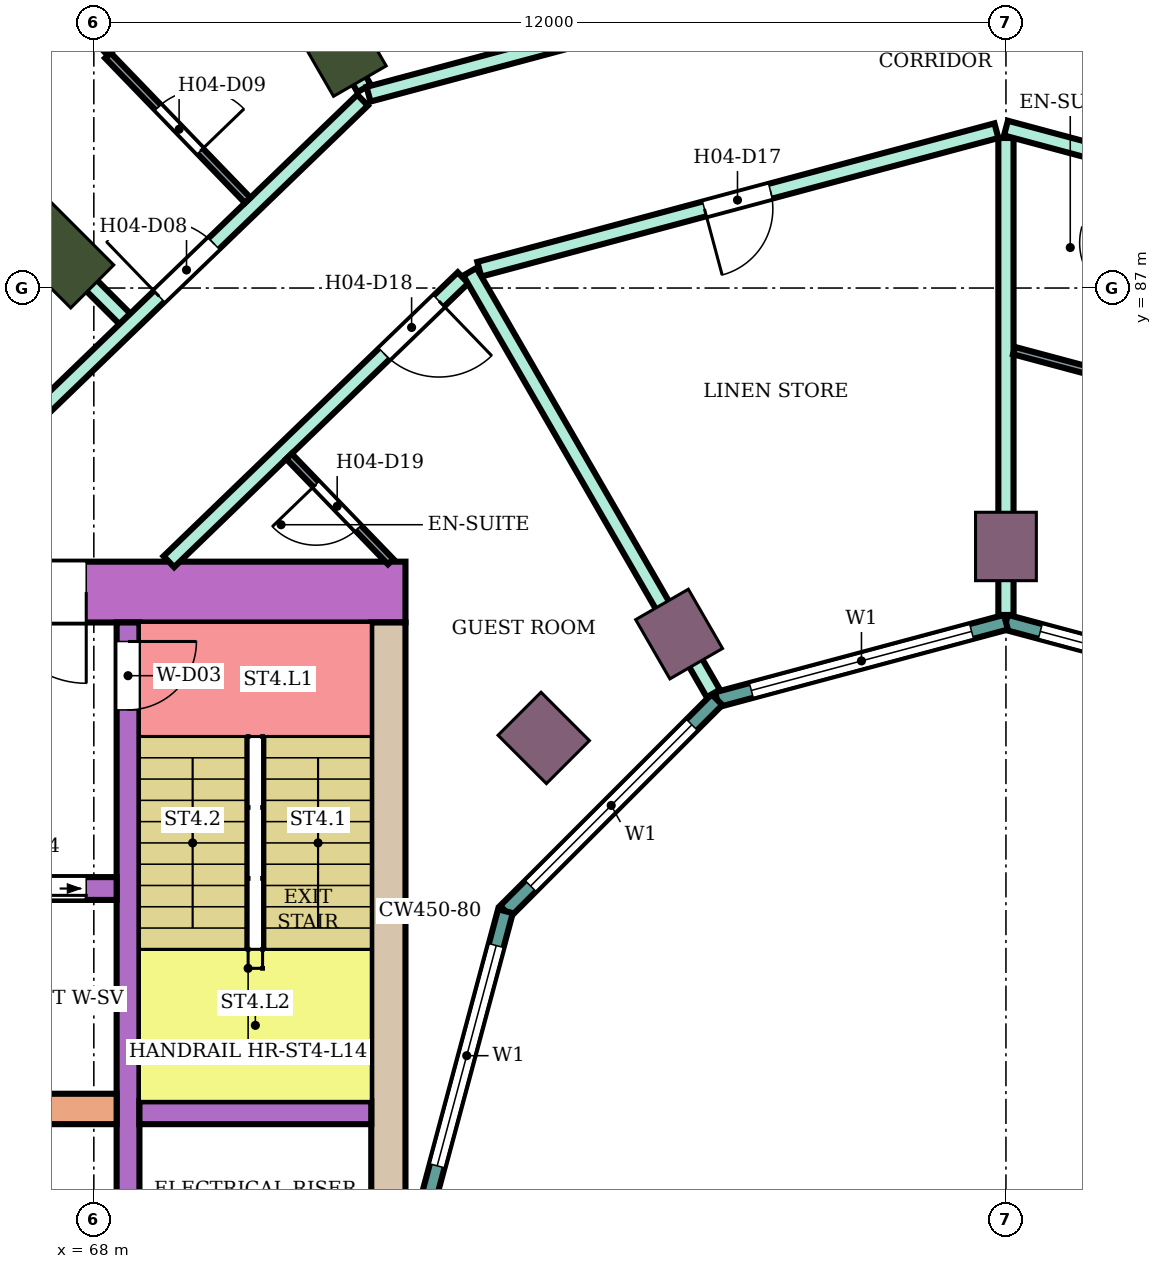
"""IFC4 building model, lengths in metres.
Left out: names, types, materials, properties, quantities, classifications, styles, units other than length and angle.
Written with IfcOpenShell. Run it as: python <this file> out.ifc"""

import sys

from ifc_helpers import new_model, si_unit, direction, frame, frame_2d, origin, origin_2d, place, context, subcontext, project, spatial, rectangle, extrude, element, fill, save


model = new_model("IFC4")
c1 = context("Model", 3, precision=1e-05, world=origin(), true_north=direction((0.0, 1.0)))
c2 = subcontext(c1, "Body", "Model", "MODEL_VIEW")
j1 = project(units=[si_unit("LENGTHUNIT", "METRE"), si_unit("PLANEANGLEUNIT", "RADIAN")], contexts=[c1])
p1 = place(None, origin())
s1 = spatial("IfcSite", under=j1, at=p1, CompositionType="ELEMENT")
p2 = place(p1, origin())
s2 = spatial("IfcBuilding", under=s1, at=p2, CompositionType="ELEMENT")
p3 = place(p2, frame((0.0, 0.0, 63.0)))
s3 = spatial("IfcBuildingStorey", under=s2, at=p3, CompositionType="ELEMENT", Elevation=63.0)
for number, where, z_axis, x_axis in (
    (1, (71.2, 90.242, 0.0), (0.0, 0.0, 1.0), (-0.5, 0.866, 0.0)),
    (2, (67.555, 87.445, 0.0), (0.0, 0.0, 1.0), (-0.707, 0.707, 0.0)),
):
    element("IfcColumn", number, at=place(p3, frame(where, z_axis=z_axis, x_axis=x_axis)), inside=s3, PredefinedType="COLUMN", context=c2, shape_type="SweptSolid", body=[
        extrude(rectangle(XDim=1.2, YDim=0.8, at=origin_2d()), origin(), (0.0, 0.0, 1.0), 3.8),
    ])
for number, where, z_axis, x_axis in (
    (3, (80.0, 83.6, 0.0), (0.0, 0.0, 1.0), (0.0, 1.0, 0.0)),
    (4, (75.7, 82.448, 0.0), (0.0, 0.0, 1.0), (-0.5, 0.866, 0.0)),
    (5, (73.919, 81.081, 0.0), (0.0, 0.0, 1.0), (-0.707, 0.707, 0.0)),
):
    element("IfcColumn", number, at=place(p3, frame(where, z_axis=z_axis, x_axis=x_axis)), inside=s3, PredefinedType="COLUMN", context=c2, shape_type="SweptSolid", body=[
        extrude(rectangle(XDim=0.9, YDim=0.8, at=origin_2d()), origin(), (0.0, 0.0, 1.0), 3.8),
    ])
p4 = place(p3, frame((72.1, 83.0, 0.0), z_axis=(0.0, 0.0, 1.0), x_axis=(-1.0, 0.0, 0.0)))
e6 = element("IfcWall", 6, at=p4, inside=s3, PredefinedType="SHEAR", context=c2, shape_type="SweptSolid", body=[
    extrude(rectangle(XDim=14.7, YDim=0.8, at=frame_2d((7.35, 0.0))), origin(), (0.0, 0.0, 1.0), 3.48),
])
p5 = place(p4, frame((4.2, 0.0, 0.0)))
e7 = element("IfcOpeningElement", 7, at=p5, cuts=e6, PredefinedType="OPENING", context=c2, shape_type="SweptSolid", body=[
    extrude(rectangle(XDim=2.4, YDim=2.4, at=frame_2d((1.2, 1.2))), frame((0.0, 0.41, 0.0), z_axis=(0.0, -1.0, 0.0), x_axis=(1.0, 0.0, 0.0)), (0.0, 0.0, 1.0), 0.82),
])
p6 = place(p3, frame((71.875, 82.6, 0.0), z_axis=(0.0, 0.0, 1.0), x_axis=(0.0, -1.0, 0.0)))
e8 = element("IfcWall", 8, at=p6, inside=s3, PredefinedType="SHEAR", context=c2, shape_type="SweptSolid", body=[
    extrude(rectangle(XDim=7.6, YDim=0.45, at=frame_2d((3.8, 0.0))), origin(), (0.0, 0.0, 1.0), 3.48),
])
p7 = place(p3, frame((68.45, 82.6, 0.0), z_axis=(0.0, 0.0, 1.0), x_axis=(0.0, -1.0, 0.0)))
e9 = element("IfcWall", 9, at=p7, inside=s3, PredefinedType="SHEAR", context=c2, shape_type="SweptSolid", body=[
    extrude(rectangle(XDim=7.6, YDim=0.3, at=frame_2d((3.8, 0.0))), origin(), (0.0, 0.0, 1.0), 3.48),
])
p8 = place(p7, frame((0.25, 0.0, 0.0)))
e10 = element("IfcOpeningElement", 10, at=p8, cuts=e9, PredefinedType="OPENING", context=c2, shape_type="SweptSolid", body=[
    extrude(rectangle(XDim=0.9, YDim=2.1, at=frame_2d((0.45, 1.05))), frame((0.0, 0.16, 0.0), z_axis=(0.0, -1.0, 0.0), x_axis=(1.0, 0.0, 0.0)), (0.0, 0.0, 1.0), 0.32),
])
p9 = place(p3, frame((71.65, 76.15, 0.0), z_axis=(0.0, 0.0, 1.0), x_axis=(-1.0, 0.0, 0.0)))
e11 = element("IfcWall", 11, at=p9, inside=s3, PredefinedType="SHEAR", context=c2, shape_type="SweptSolid", body=[
    extrude(rectangle(XDim=3.05, YDim=0.3, at=frame_2d((1.525, 0.0))), origin(), (0.0, 0.0, 1.0), 3.48),
])
p10 = place(p3, frame((68.3, 76.2, 0.0), z_axis=(0.0, 0.0, 1.0), x_axis=(-1.0, 0.0, 0.0)))
e12 = element("IfcWall", 12, at=p10, inside=s3, PredefinedType="SHEAR", context=c2, shape_type="SweptSolid", body=[
    extrude(rectangle(XDim=10.9, YDim=0.4, at=frame_2d((5.45, 0.0))), origin(), (0.0, 0.0, 1.0), 3.48),
])
p11 = place(p3, frame((68.3, 79.1, 0.0), z_axis=(0.0, 0.0, 1.0), x_axis=(-1.0, 0.0, 0.0)))
e13 = element("IfcWall", 13, at=p11, inside=s3, PredefinedType="SHEAR", context=c2, shape_type="SweptSolid", body=[
    extrude(rectangle(XDim=10.9, YDim=0.3, at=frame_2d((5.45, 0.0))), origin(), (0.0, 0.0, 1.0), 3.48),
])
p12 = place(p11, frame((0.4, 0.0, 0.0)))
e14 = element("IfcOpeningElement", 14, at=p12, cuts=e13, PredefinedType="OPENING", context=c2, shape_type="SweptSolid", body=[
    extrude(rectangle(XDim=1.4, YDim=2.1, at=frame_2d((0.7, 1.05))), frame((0.0, 0.16, 0.0), z_axis=(0.0, -1.0, 0.0), x_axis=(1.0, 0.0, 0.0)), (0.0, 0.0, 1.0), 0.32),
])
p13 = place(p11, frame((5.4, 0.0, 0.0)))
e15 = element("IfcOpeningElement", 15, at=p13, cuts=e13, PredefinedType="OPENING", context=c2, shape_type="SweptSolid", body=[
    extrude(rectangle(XDim=1.4, YDim=2.1, at=frame_2d((0.7, 1.05))), frame((0.0, 0.16, 0.0), z_axis=(0.0, -1.0, 0.0), x_axis=(1.0, 0.0, 0.0)), (0.0, 0.0, 1.0), 0.32),
])
p14 = place(p11, frame((8.1, 0.0, 0.0)))
e16 = element("IfcOpeningElement", 16, at=p14, cuts=e13, PredefinedType="OPENING", context=c2, shape_type="SweptSolid", body=[
    extrude(rectangle(XDim=1.0, YDim=2.1, at=frame_2d((0.5, 1.05))), frame((0.0, 0.16, 0.0), z_axis=(0.0, -1.0, 0.0), x_axis=(1.0, 0.0, 0.0)), (0.0, 0.0, 1.0), 0.32),
])
p15 = place(p3, frame((83.802, 81.585, 0.0), z_axis=(0.0, 0.0, 1.0), x_axis=(-0.965933654434, 0.258789828301, 0.0)))
e17 = element("IfcWall", 17, at=p15, inside=s3, PredefinedType="NOTDEFINED", context=c2, shape_type="SweptSolid", body=[
    extrude(rectangle(XDim=3.936, YDim=0.2, at=frame_2d((1.968, 0.0))), origin(), (0.0, 0.0, 1.0), 3.8),
])
p16 = place(p15, frame((0.468, 0.0, 0.9)))
e18 = element("IfcOpeningElement", 18, at=p16, cuts=e17, PredefinedType="OPENING", context=c2, shape_type="SweptSolid", body=[
    extrude(rectangle(XDim=3.0, YDim=2.3, at=frame_2d((1.5, 1.15))), frame((0.0, 0.11, 0.0), z_axis=(0.0, -1.0, 0.0), x_axis=(1.0, 0.0, 0.0)), (0.0, 0.0, 1.0), 0.22),
])
p17 = place(p3, frame((80.0, 82.604, 0.0), z_axis=(0.0, 0.0, 1.0), x_axis=(-0.965933654434, -0.258789828301, 0.0)))
e19 = element("IfcWall", 19, at=p17, inside=s3, PredefinedType="NOTDEFINED", context=c2, shape_type="SweptSolid", body=[
    extrude(rectangle(XDim=3.936, YDim=0.2, at=frame_2d((1.968, 0.0))), origin(), (0.0, 0.0, 1.0), 3.8),
])
p18 = place(p17, frame((0.468, 0.0, 0.9)))
e20 = element("IfcOpeningElement", 20, at=p18, cuts=e19, PredefinedType="OPENING", context=c2, shape_type="SweptSolid", body=[
    extrude(rectangle(XDim=3.0, YDim=2.3, at=frame_2d((1.5, 1.15))), frame((0.0, 0.11, 0.0), z_axis=(0.0, -1.0, 0.0), x_axis=(1.0, 0.0, 0.0)), (0.0, 0.0, 1.0), 0.22),
])
p19 = place(p3, frame((76.198, 81.585, 0.0), z_axis=(0.0, 0.0, 1.0), x_axis=(-0.707106781187, -0.707106781187, 0.0)))
e21 = element("IfcWall", 21, at=p19, inside=s3, PredefinedType="NOTDEFINED", context=c2, shape_type="SweptSolid", body=[
    extrude(rectangle(XDim=3.936, YDim=0.2, at=frame_2d((1.968, 0.0))), origin(), (0.0, 0.0, 1.0), 3.8),
])
p20 = place(p19, frame((0.468, 0.0, 0.9)))
e22 = element("IfcOpeningElement", 22, at=p20, cuts=e21, PredefinedType="OPENING", context=c2, shape_type="SweptSolid", body=[
    extrude(rectangle(XDim=3.0, YDim=2.3, at=frame_2d((1.5, 1.15))), frame((0.0, 0.11, 0.0), z_axis=(0.0, -1.0, 0.0), x_axis=(1.0, 0.0, 0.0)), (0.0, 0.0, 1.0), 0.22),
])
p21 = place(p3, frame((73.415, 78.802, 0.0), z_axis=(0.0, 0.0, 1.0), x_axis=(-0.258789828301, -0.965933654434, 0.0)))
e23 = element("IfcWall", 23, at=p21, inside=s3, PredefinedType="NOTDEFINED", context=c2, shape_type="SweptSolid", body=[
    extrude(rectangle(XDim=3.936, YDim=0.2, at=frame_2d((1.968, 0.0))), origin(), (0.0, 0.0, 1.0), 3.8),
])
p22 = place(p21, frame((0.468, 0.0, 0.9)))
e24 = element("IfcOpeningElement", 24, at=p22, cuts=e23, PredefinedType="OPENING", context=c2, shape_type="SweptSolid", body=[
    extrude(rectangle(XDim=3.0, YDim=2.3, at=frame_2d((1.5, 1.15))), frame((0.0, 0.11, 0.0), z_axis=(0.0, -1.0, 0.0), x_axis=(1.0, 0.0, 0.0)), (0.0, 0.0, 1.0), 0.22),
])
p23 = place(p3, frame((63.598, 91.407, 0.0), z_axis=(0.0, 0.0, 1.0), x_axis=(0.706981202484, -0.707232337591, 0.0)))
e25 = element("IfcWall", 25, at=p23, inside=s3, PredefinedType="PARTITIONING", context=c2, shape_type="SweptSolid", body=[
    extrude(rectangle(XDim=6.805, YDim=0.2, at=frame_2d((3.402, 0.0))), origin(), (0.0, 0.0, 1.0), 3.35),
])
p24 = place(p3, frame((66.797, 84.9, 0.0), z_axis=(0.0, 0.0, 1.0), x_axis=(0.719692092412, 0.694293376116, 0.0)))
e26 = element("IfcWall", 26, at=p24, inside=s3, PredefinedType="PARTITIONING", context=c2, shape_type="SweptSolid", body=[
    extrude(rectangle(XDim=6.584, YDim=0.2, at=frame_2d((3.292, 0.0))), origin(), (0.0, 0.0, 1.0), 3.35),
])
p25 = place(p24, frame((2.866, 0.0, 0.0)))
e27 = element("IfcOpeningElement", 27, at=p25, cuts=e26, PredefinedType="OPENING", context=c2, shape_type="SweptSolid", body=[
    extrude(rectangle(XDim=1.0, YDim=2.1, at=frame_2d((0.5, 1.05))), frame((0.0, 0.11, 0.0), z_axis=(0.0, -1.0, 0.0), x_axis=(1.0, 0.0, 0.0)), (0.0, 0.0, 1.0), 0.22),
])
p26 = place(p3, frame((67.101, 97.342, 0.0), z_axis=(0.0, 0.0, 1.0), x_axis=(0.499932813297, -0.866064190571, 0.0)))
e28 = element("IfcWall", 28, at=p26, inside=s3, PredefinedType="PARTITIONING", context=c2, shape_type="SweptSolid", body=[
    extrude(rectangle(XDim=8.908, YDim=0.2, at=frame_2d((4.454, 0.0))), origin(), (0.0, 0.0, 1.0), 3.35),
])
p27 = place(p3, frame((68.987, 83.4, 0.0), z_axis=(0.0, 0.0, 1.0), x_axis=(0.719591503389, 0.694397629784, 0.0)))
e29 = element("IfcWall", 29, at=p27, inside=s3, PredefinedType="PARTITIONING", context=c2, shape_type="SweptSolid", body=[
    extrude(rectangle(XDim=5.378, YDim=0.2, at=frame_2d((2.689, 0.0))), origin(), (0.0, 0.0, 1.0), 3.35),
])
p28 = place(p27, frame((3.938, 0.0, 0.0)))
e30 = element("IfcOpeningElement", 30, at=p28, cuts=e29, PredefinedType="OPENING", context=c2, shape_type="SweptSolid", body=[
    extrude(rectangle(XDim=1.0, YDim=2.1, at=frame_2d((0.5, 1.05))), frame((0.0, 0.11, 0.0), z_axis=(0.0, -1.0, 0.0), x_axis=(1.0, 0.0, 0.0)), (0.0, 0.0, 1.0), 0.22),
])
p29 = place(p3, frame((71.614, 89.55, 0.0), z_axis=(0.0, 0.0, 1.0), x_axis=(0.965982156828, 0.258608725086, 0.0)))
e31 = element("IfcWall", 31, at=p29, inside=s3, PredefinedType="PARTITIONING", context=c2, shape_type="SweptSolid", body=[
    extrude(rectangle(XDim=8.592, YDim=0.2, at=frame_2d((4.296, 0.0))), origin(), (0.0, 0.0, 1.0), 3.35),
])
p30 = place(p29, frame((4.865, 0.0, 0.0)))
e32 = element("IfcOpeningElement", 32, at=p30, cuts=e31, PredefinedType="OPENING", context=c2, shape_type="SweptSolid", body=[
    extrude(rectangle(XDim=1.0, YDim=2.1, at=frame_2d((0.5, 1.05))), frame((0.0, 0.11, 0.0), z_axis=(0.0, -1.0, 0.0), x_axis=(1.0, 0.0, 0.0)), (0.0, 0.0, 1.0), 0.22),
])
p31 = place(p29, frame((2.804, 0.0, 0.0)))
e33 = element("IfcOpeningElement", 33, at=p31, cuts=e31, PredefinedType="OPENING", context=c2, shape_type="SweptSolid", body=[
    extrude(rectangle(XDim=1.0, YDim=2.1, at=frame_2d((0.5, 1.05))), frame((0.0, 0.11, 0.0), z_axis=(0.0, -1.0, 0.0), x_axis=(1.0, 0.0, 0.0)), (0.0, 0.0, 1.0), 0.22),
])
p32 = place(p3, frame((73.071, 87.247, 0.0), z_axis=(0.0, 0.0, 1.0), x_axis=(0.965914318977, 0.258861987157, 0.0)))
e34 = element("IfcWall", 34, at=p32, inside=s3, PredefinedType="PARTITIONING", context=c2, shape_type="SweptSolid", body=[
    extrude(rectangle(XDim=7.043, YDim=0.2, at=frame_2d((3.521, 0.0))), origin(), (0.0, 0.0, 1.0), 3.35),
])
p33 = place(p32, frame((3.067, 0.0, 0.0)))
e35 = element("IfcOpeningElement", 35, at=p33, cuts=e34, PredefinedType="OPENING", context=c2, shape_type="SweptSolid", body=[
    extrude(rectangle(XDim=0.9, YDim=2.1, at=frame_2d((0.45, 1.05))), frame((0.0, 0.11, 0.0), z_axis=(0.0, -1.0, 0.0), x_axis=(1.0, 0.0, 0.0)), (0.0, 0.0, 1.0), 0.22),
])
p34 = place(p3, frame((72.948, 87.214, 0.0), z_axis=(0.0, 0.0, 1.0), x_axis=(0.499927021214, -0.866067534006, 0.0)))
e36 = element("IfcWall", 36, at=p34, inside=s3, PredefinedType="PARTITIONING", context=c2, shape_type="SweptSolid", body=[
    extrude(rectangle(XDim=6.405, YDim=0.2, at=frame_2d((3.203, 0.0))), origin(), (0.0, 0.0, 1.0), 3.35),
])
p35 = place(p3, frame((80.0, 82.699, 0.0), z_axis=(0.0, 0.0, 1.0), x_axis=(0.0, 1.0, 0.0)))
e37 = element("IfcWall", 37, at=p35, inside=s3, PredefinedType="PARTITIONING", context=c2, shape_type="SweptSolid", body=[
    extrude(rectangle(XDim=6.275, YDim=0.2, at=frame_2d((3.138, 0.0))), origin(), (0.0, 0.0, 1.0), 3.35),
])
p36 = place(p3, frame((80.0, 89.104, 0.0), z_axis=(0.0, 0.0, 1.0), x_axis=(0.965854247166, -0.25908603442, 0.0)))
e38 = element("IfcWall", 38, at=p36, inside=s3, PredefinedType="PARTITIONING", context=c2, shape_type="SweptSolid", body=[
    extrude(rectangle(XDim=7.183, YDim=0.2, at=frame_2d((3.592, 0.0))), origin(), (0.0, 0.0, 1.0), 3.35),
])
p37 = place(p36, frame((5.763, 0.0, 0.0)))
e39 = element("IfcOpeningElement", 39, at=p37, cuts=e38, PredefinedType="OPENING", context=c2, shape_type="SweptSolid", body=[
    extrude(rectangle(XDim=1.0, YDim=2.1, at=frame_2d((0.5, 1.05))), frame((0.0, 0.11, 0.0), z_axis=(0.0, -1.0, 0.0), x_axis=(1.0, 0.0, 0.0)), (0.0, 0.0, 1.0), 0.22),
])
p38 = place(p3, frame((80.0, 91.796, 0.0), z_axis=(0.0, 0.0, 1.0), x_axis=(0.965891796243, -0.258946013582, 0.0)))
e40 = element("IfcWall", 40, at=p38, inside=s3, PredefinedType="PARTITIONING", context=c2, shape_type="SweptSolid", body=[
    extrude(rectangle(XDim=8.642, YDim=0.2, at=frame_2d((4.321, 0.0))), origin(), (0.0, 0.0, 1.0), 3.35),
])
p39 = place(p38, frame((2.817, 0.0, 0.0)))
e41 = element("IfcOpeningElement", 41, at=p39, cuts=e40, PredefinedType="OPENING", context=c2, shape_type="SweptSolid", body=[
    extrude(rectangle(XDim=1.0, YDim=2.1, at=frame_2d((0.5, 1.05))), frame((0.0, 0.11, 0.0), z_axis=(0.0, -1.0, 0.0), x_axis=(1.0, 0.0, 0.0)), (0.0, 0.0, 1.0), 0.22),
])
p40 = place(p3, frame((68.185, 90.06, 0.0), z_axis=(0.0, 0.0, 1.0), x_axis=(0.69446127412, -0.719530081892, 0.0)))
e42 = element("IfcWall", 42, at=p40, inside=s3, PredefinedType="PARTITIONING", context=c2, shape_type="SweptSolid", body=[
    extrude(rectangle(XDim=2.649, YDim=0.1, at=frame_2d((1.324, 0.0))), origin(), (0.0, 0.0, 1.0), 3.35),
])
p41 = place(p40, frame((0.95, 0.0, 0.0)))
e43 = element("IfcOpeningElement", 43, at=p41, cuts=e42, PredefinedType="OPENING", context=c2, shape_type="SweptSolid", body=[
    extrude(rectangle(XDim=0.8, YDim=2.1, at=frame_2d((0.4, 1.05))), frame((0.0, 0.06, 0.0), z_axis=(0.0, -1.0, 0.0), x_axis=(1.0, 0.0, 0.0)), (0.0, 0.0, 1.0), 0.12),
])
p42 = place(p3, frame((68.15, 90.096, 0.0), z_axis=(0.0, 0.0, 1.0), x_axis=(0.719669144226, 0.694317163009, 0.0)))
e44 = element("IfcWall", 44, at=p42, inside=s3, PredefinedType="PARTITIONING", context=c2, shape_type="SweptSolid", body=[
    extrude(rectangle(XDim=2.687, YDim=0.1, at=frame_2d((1.343, 0.0))), origin(), (0.0, 0.0, 1.0), 3.35),
])
p43 = place(p3, frame((70.567, 84.786, 0.0), z_axis=(0.0, 0.0, 1.0), x_axis=(0.694447472534, -0.719543402368, 0.0)))
e45 = element("IfcWall", 45, at=p43, inside=s3, PredefinedType="PARTITIONING", context=c2, shape_type="SweptSolid", body=[
    extrude(rectangle(XDim=1.926, YDim=0.1, at=frame_2d((0.963, 0.0))), origin(), (0.0, 0.0, 1.0), 3.35),
])
p44 = place(p43, frame((0.513, 0.0, 0.0)))
e46 = element("IfcOpeningElement", 46, at=p44, cuts=e45, PredefinedType="OPENING", context=c2, shape_type="SweptSolid", body=[
    extrude(rectangle(XDim=0.8, YDim=2.1, at=frame_2d((0.4, 1.05))), frame((0.0, 0.06, 0.0), z_axis=(0.0, -1.0, 0.0), x_axis=(1.0, 0.0, 0.0)), (0.0, 0.0, 1.0), 0.12),
])
p45 = place(p3, frame((80.106, 86.177, 0.0), z_axis=(0.0, 0.0, 1.0), x_axis=(0.966002973184, -0.258530957139, 0.0)))
e47 = element("IfcWall", 47, at=p45, inside=s3, PredefinedType="PARTITIONING", context=c2, shape_type="SweptSolid", body=[
    extrude(rectangle(XDim=1.19, YDim=0.1, at=frame_2d((0.595, 0.0))), origin(), (0.0, 0.0, 1.0), 3.35),
])
p46 = place(p16, origin())
e48 = element("IfcWindow", 48, at=p46, inside=s3, PartitioningType="SINGLE_PANEL", PredefinedType="WINDOW", context=c2, shape_type="SweptSolid", body=[
    extrude(rectangle(XDim=3.0, YDim=2.3, at=frame_2d((1.5, 1.15))), frame((0.0, 0.03, 0.0), z_axis=(0.0, -1.0, 0.0), x_axis=(1.0, 0.0, 0.0)), (0.0, 0.0, 1.0), 0.06),
])
fill(e18, e48)
p47 = place(p18, origin())
e49 = element("IfcWindow", 49, at=p47, inside=s3, PartitioningType="SINGLE_PANEL", PredefinedType="WINDOW", context=c2, shape_type="SweptSolid", body=[
    extrude(rectangle(XDim=3.0, YDim=2.3, at=frame_2d((1.5, 1.15))), frame((0.0, 0.03, 0.0), z_axis=(0.0, -1.0, 0.0), x_axis=(1.0, 0.0, 0.0)), (0.0, 0.0, 1.0), 0.06),
])
fill(e20, e49)
p48 = place(p20, origin())
e50 = element("IfcWindow", 50, at=p48, inside=s3, PartitioningType="SINGLE_PANEL", PredefinedType="WINDOW", context=c2, shape_type="SweptSolid", body=[
    extrude(rectangle(XDim=3.0, YDim=2.3, at=frame_2d((1.5, 1.15))), frame((0.0, 0.03, 0.0), z_axis=(0.0, -1.0, 0.0), x_axis=(1.0, 0.0, 0.0)), (0.0, 0.0, 1.0), 0.06),
])
fill(e22, e50)
p49 = place(p22, origin())
e51 = element("IfcWindow", 51, at=p49, inside=s3, PartitioningType="SINGLE_PANEL", PredefinedType="WINDOW", context=c2, shape_type="SweptSolid", body=[
    extrude(rectangle(XDim=3.0, YDim=2.3, at=frame_2d((1.5, 1.15))), frame((0.0, 0.03, 0.0), z_axis=(0.0, -1.0, 0.0), x_axis=(1.0, 0.0, 0.0)), (0.0, 0.0, 1.0), 0.06),
])
fill(e24, e51)
p50 = place(p25, origin())
e52 = element("IfcDoor", 52, at=p50, inside=s3, OperationType="SINGLE_SWING_LEFT", PredefinedType="DOOR", context=c2, shape_type="SweptSolid", body=[
    extrude(rectangle(XDim=1.0, YDim=2.1, at=frame_2d((0.5, 1.05))), frame((0.0, 0.025, 0.0), z_axis=(0.0, -1.0, 0.0), x_axis=(1.0, 0.0, 0.0)), (0.0, 0.0, 1.0), 0.05),
])
fill(e27, e52)
p51 = place(p41, origin())
e53 = element("IfcDoor", 53, at=p51, inside=s3, OperationType="SINGLE_SWING_RIGHT", PredefinedType="DOOR", context=c2, shape_type="SweptSolid", body=[
    extrude(rectangle(XDim=0.8, YDim=2.1, at=frame_2d((0.4, 1.05))), frame((0.0, 0.025, 0.0), z_axis=(0.0, -1.0, 0.0), x_axis=(1.0, 0.0, 0.0)), (0.0, 0.0, 1.0), 0.05),
])
fill(e43, e53)
p52 = place(p33, frame((0.9, 0.0, 0.0), z_axis=(0.0, 0.0, 1.0), x_axis=(-1.0, 0.0, 0.0)))
e54 = element("IfcDoor", 54, at=p52, inside=s3, OperationType="SINGLE_SWING_RIGHT", PredefinedType="DOOR", context=c2, shape_type="SweptSolid", body=[
    extrude(rectangle(XDim=0.9, YDim=2.1, at=frame_2d((0.45, 1.05))), frame((0.0, 0.025, 0.0), z_axis=(0.0, -1.0, 0.0), x_axis=(1.0, 0.0, 0.0)), (0.0, 0.0, 1.0), 0.05),
])
fill(e35, e54)
p53 = place(p28, frame((1.0, 0.0, 0.0), z_axis=(0.0, 0.0, 1.0), x_axis=(-1.0, 0.0, 0.0)))
e55 = element("IfcDoor", 55, at=p53, inside=s3, OperationType="SINGLE_SWING_LEFT", PredefinedType="DOOR", context=c2, shape_type="SweptSolid", body=[
    extrude(rectangle(XDim=1.0, YDim=2.1, at=frame_2d((0.5, 1.05))), frame((0.0, 0.025, 0.0), z_axis=(0.0, -1.0, 0.0), x_axis=(1.0, 0.0, 0.0)), (0.0, 0.0, 1.0), 0.05),
])
fill(e30, e55)
p54 = place(p44, frame((0.8, 0.0, 0.0), z_axis=(0.0, 0.0, 1.0), x_axis=(-1.0, 0.0, 0.0)))
e56 = element("IfcDoor", 56, at=p54, inside=s3, OperationType="SINGLE_SWING_RIGHT", PredefinedType="DOOR", context=c2, shape_type="SweptSolid", body=[
    extrude(rectangle(XDim=0.8, YDim=2.1, at=frame_2d((0.4, 1.05))), frame((0.0, 0.025, 0.0), z_axis=(0.0, -1.0, 0.0), x_axis=(1.0, 0.0, 0.0)), (0.0, 0.0, 1.0), 0.05),
])
fill(e46, e56)
p55 = place(p8, origin())
e57 = element("IfcDoor", 57, at=p55, inside=s3, OperationType="SINGLE_SWING_LEFT", PredefinedType="DOOR", context=c2, shape_type="SweptSolid", body=[
    extrude(rectangle(XDim=0.9, YDim=2.1, at=frame_2d((0.45, 1.05))), frame((0.0, 0.025, 0.0), z_axis=(0.0, -1.0, 0.0), x_axis=(1.0, 0.0, 0.0)), (0.0, 0.0, 1.0), 0.05),
])
fill(e10, e57)
p56 = place(p12, origin())
e58 = element("IfcDoor", 58, at=p56, inside=s3, OperationType="DOUBLE_DOOR_SLIDING", PredefinedType="DOOR", context=c2, shape_type="SweptSolid", body=[
    extrude(rectangle(XDim=1.4, YDim=2.1, at=frame_2d((0.7, 1.05))), frame((0.0, 0.025, 0.0), z_axis=(0.0, -1.0, 0.0), x_axis=(1.0, 0.0, 0.0)), (0.0, 0.0, 1.0), 0.05),
])
fill(e14, e58)
p57 = place(p5, origin())
e59 = element("IfcDoor", 59, at=p57, inside=s3, OperationType="DOUBLE_DOOR_SINGLE_SWING", PredefinedType="DOOR", context=c2, shape_type="SweptSolid", body=[
    extrude(rectangle(XDim=2.4, YDim=2.4, at=frame_2d((1.2, 1.2))), frame((0.0, 0.025, 0.0), z_axis=(0.0, -1.0, 0.0), x_axis=(1.0, 0.0, 0.0)), (0.0, 0.0, 1.0), 0.05),
])
fill(e7, e59)
save(model, sys.argv[1])
